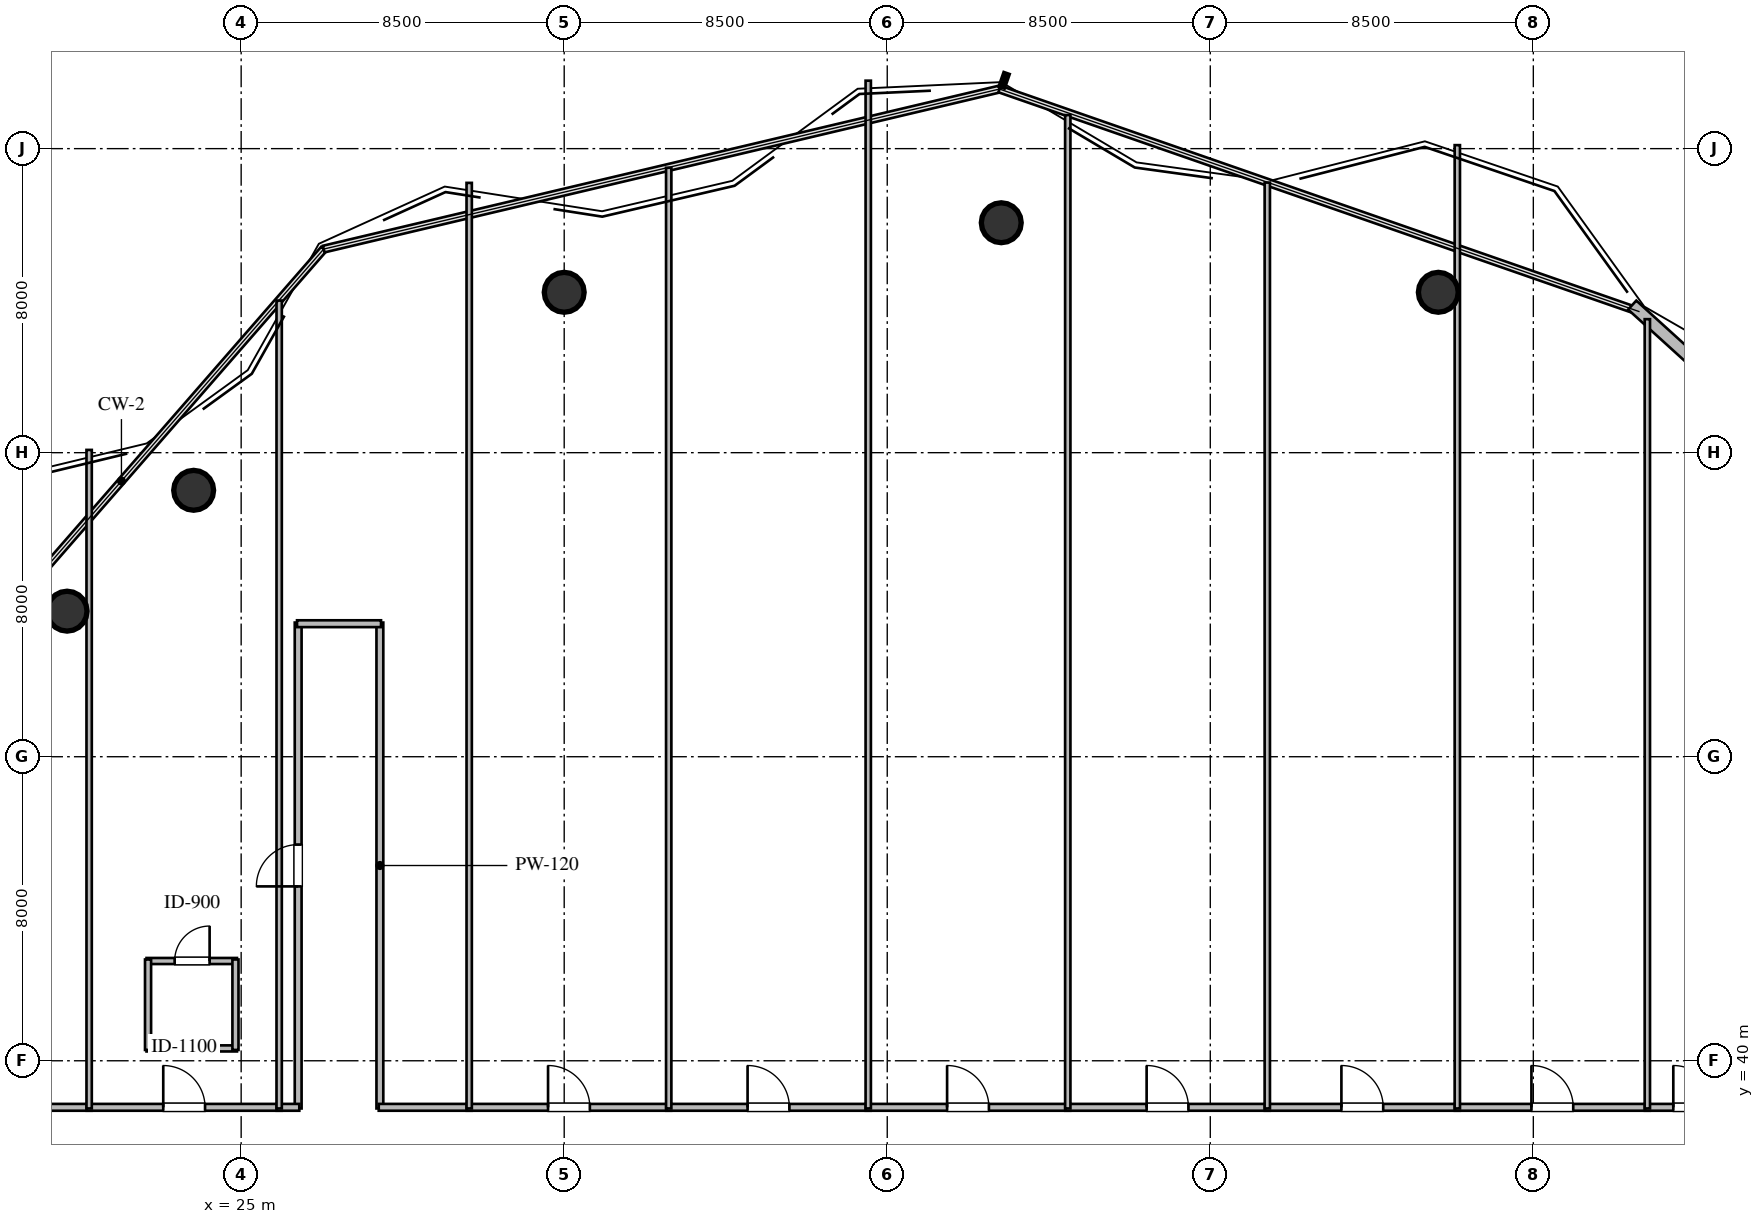
"""IFC4 building model, lengths in metres.
Left out: names, types, materials, properties, quantities, classifications, styles, units other than length and angle.
Written with IfcOpenShell. Run it as: python <this file> out.ifc"""

import sys

from ifc_helpers import new_model, si_unit, direction, frame, frame_2d, origin, origin_2d, place, context, subcontext, project, spatial, rectangle, circle, extrude, element, fill, save


model = new_model("IFC4")
c1 = context("Model", 3, precision=1e-05, world=origin(), true_north=direction((0.0, 1.0)))
c2 = subcontext(c1, "Body", "Model", "MODEL_VIEW")
j1 = project(units=[si_unit("LENGTHUNIT", "METRE"), si_unit("PLANEANGLEUNIT", "RADIAN")], contexts=[c1])
p1 = place(None, origin())
s1 = spatial("IfcSite", under=j1, at=p1, CompositionType="ELEMENT")
p2 = place(p1, origin())
s2 = spatial("IfcBuilding", under=s1, at=p2, CompositionType="ELEMENT")
p3 = place(p2, frame((0.0, 0.0, 199.2)))
s3 = spatial("IfcBuildingStorey", under=s2, at=p3, CompositionType="ELEMENT", Elevation=199.2)
for number, where, z_axis, x_axis in (
    (1, (56.5, 60.22, 0.0), (0.0, 0.0, 1.0), (1.0, 0.0, 0.0)),
    (2, (45.0, 62.05, 0.0), (0.0, 0.0, 1.0), (1.0, 0.0, 0.0)),
    (3, (33.5, 60.22, 0.0), (0.0, 0.0, 1.0), (1.0, 0.0, 0.0)),
    (4, (23.75, 55.01, 0.0), (0.0, 0.0, 1.0), (1.0, 0.0, 0.0)),
    (5, (20.42, 51.83, 0.0), (0.0, 0.0, 1.0), (1.0, 0.0, 0.0)),
):
    element("IfcColumn", number, at=place(p3, frame(where, z_axis=z_axis, x_axis=x_axis)), inside=s3, PredefinedType="COLUMN", context=c2, shape_type="SweptSolid", body=[
        extrude(circle(Radius=0.525, at=origin_2d()), origin(), (0.0, 0.0, 1.0), 3.6),
    ])
p4 = place(p3, frame((61.602, 59.884, 0.0), z_axis=(0.0, 0.0, 1.0), x_axis=(0.740416582554, -0.672148260638, 0.0)))
e6 = element("IfcWall", 6, at=p4, inside=s3, PredefinedType="STANDARD", context=c2, shape_type="SweptSolid", body=[
    extrude(rectangle(XDim=16.361, YDim=0.32, at=frame_2d((8.181, 0.0))), origin(), (0.0, 0.0, 1.0), 3.36),
])
p5 = place(p3, frame((22.51, 40.325, 0.0), z_axis=(0.0, 0.0, 1.0), x_axis=(1.0, 0.0, 0.0)))
e7 = element("IfcWall", 7, at=p5, inside=s3, PredefinedType="PLUMBINGWALL", context=c2, shape_type="SweptSolid", body=[
    extrude(rectangle(XDim=2.38, YDim=0.16, at=frame_2d((1.19, 0.0))), origin(), (0.0, 0.0, 1.0), 3.36),
])
p6 = place(p3, frame((22.51, 42.625, 0.0), z_axis=(0.0, 0.0, 1.0), x_axis=(1.0, 0.0, 0.0)))
e8 = element("IfcWall", 8, at=p6, inside=s3, PredefinedType="PLUMBINGWALL", context=c2, shape_type="SweptSolid", body=[
    extrude(rectangle(XDim=2.38, YDim=0.16, at=frame_2d((1.19, 0.0))), origin(), (0.0, 0.0, 1.0), 3.36),
])
p7 = place(p6, frame((0.74, 0.0, 0.0)))
e9 = element("IfcOpeningElement", 9, at=p7, cuts=e8, PredefinedType="OPENING", context=c2, shape_type="SweptSolid", body=[
    extrude(rectangle(XDim=0.92, YDim=2.1, at=frame_2d((0.46, 1.05))), frame((0.0, 0.09, 0.0), z_axis=(0.0, -1.0, 0.0), x_axis=(1.0, 0.0, 0.0)), (0.0, 0.0, 1.0), 0.18),
])
p8 = place(p3, frame((22.55, 40.285, 0.0), z_axis=(0.0, 0.0, 1.0), x_axis=(0.0, 1.0, 0.0)))
e10 = element("IfcWall", 10, at=p8, inside=s3, PredefinedType="PLUMBINGWALL", context=c2, shape_type="SweptSolid", body=[
    extrude(rectangle(XDim=2.38, YDim=0.16, at=frame_2d((1.19, 0.0))), origin(), (0.0, 0.0, 1.0), 2.806),
])
p9 = place(p3, frame((24.85, 40.285, 0.0), z_axis=(0.0, 0.0, 1.0), x_axis=(0.0, 1.0, 0.0)))
e11 = element("IfcWall", 11, at=p9, inside=s3, PredefinedType="PLUMBINGWALL", context=c2, shape_type="SweptSolid", body=[
    extrude(rectangle(XDim=2.38, YDim=0.16, at=frame_2d((1.19, 0.0))), origin(), (0.0, 0.0, 1.0), 3.36),
])
p10 = place(p3, frame((17.155, 38.775, 0.0), z_axis=(0.0, 0.0, 1.0), x_axis=(1.0, 0.0, 0.0)))
e12 = element("IfcWall", 12, at=p10, inside=s3, PredefinedType="PARTITIONING", context=c2, shape_type="SweptSolid", body=[
    extrude(rectangle(XDim=3.91, YDim=0.18, at=frame_2d((1.955, 0.0))), origin(), (0.0, 0.0, 1.0), 3.36),
])
p11 = place(p10, frame((1.405, 0.0, 0.0)))
e13 = element("IfcOpeningElement", 13, at=p11, cuts=e12, PredefinedType="OPENING", context=c2, shape_type="SweptSolid", body=[
    extrude(rectangle(XDim=1.1, YDim=2.1, at=frame_2d((0.55, 1.05))), frame((0.0, 0.1, 0.0), z_axis=(0.0, -1.0, 0.0), x_axis=(1.0, 0.0, 0.0)), (0.0, 0.0, 1.0), 0.2),
])
p12 = place(p3, frame((20.935, 38.775, 0.0), z_axis=(0.0, 0.0, 1.0), x_axis=(1.0, 0.0, 0.0)))
e14 = element("IfcWall", 14, at=p12, inside=s3, PredefinedType="PARTITIONING", context=c2, shape_type="SweptSolid", body=[
    extrude(rectangle(XDim=5.13, YDim=0.18, at=frame_2d((2.565, 0.0))), origin(), (0.0, 0.0, 1.0), 3.36),
])
p13 = place(p12, frame((2.015, 0.0, 0.0)))
e15 = element("IfcOpeningElement", 15, at=p13, cuts=e14, PredefinedType="OPENING", context=c2, shape_type="SweptSolid", body=[
    extrude(rectangle(XDim=1.1, YDim=2.1, at=frame_2d((0.55, 1.05))), frame((0.0, 0.1, 0.0), z_axis=(0.0, -1.0, 0.0), x_axis=(1.0, 0.0, 0.0)), (0.0, 0.0, 1.0), 0.2),
])
p14 = place(p3, frame((26.5, 38.745, 0.0), z_axis=(0.0, 0.0, 1.0), x_axis=(0.0, 1.0, 0.0)))
e16 = element("IfcWall", 16, at=p14, inside=s3, PredefinedType="PARTITIONING", context=c2, shape_type="SweptSolid", body=[
    extrude(rectangle(XDim=12.785, YDim=0.18, at=frame_2d((6.393, 0.0))), origin(), (0.0, 0.0, 1.0), 3.36),
])
p15 = place(p14, frame((5.843, 0.0, 0.0)))
e17 = element("IfcOpeningElement", 17, at=p15, cuts=e16, PredefinedType="OPENING", context=c2, shape_type="SweptSolid", body=[
    extrude(rectangle(XDim=1.1, YDim=2.1, at=frame_2d((0.55, 1.05))), frame((0.0, 0.1, 0.0), z_axis=(0.0, -1.0, 0.0), x_axis=(1.0, 0.0, 0.0)), (0.0, 0.0, 1.0), 0.2),
])
p16 = place(p3, frame((28.65, 51.53, 0.0), z_axis=(0.0, 0.0, 1.0), x_axis=(0.0, -1.0, 0.0)))
e18 = element("IfcWall", 18, at=p16, inside=s3, PredefinedType="PARTITIONING", context=c2, shape_type="SweptSolid", body=[
    extrude(rectangle(XDim=12.785, YDim=0.18, at=frame_2d((6.393, 0.0))), origin(), (0.0, 0.0, 1.0), 3.36),
])
p17 = place(p3, frame((28.62, 38.775, 0.0), z_axis=(0.0, 0.0, 1.0), x_axis=(1.0, 0.0, 0.0)))
e19 = element("IfcWall", 19, at=p17, inside=s3, PredefinedType="PARTITIONING", context=c2, shape_type="SweptSolid", body=[
    extrude(rectangle(XDim=2.445, YDim=0.18, at=frame_2d((1.222, 0.0))), origin(), (0.0, 0.0, 1.0), 3.36),
])
p18 = place(p3, frame((26.47, 51.5, 0.0), z_axis=(0.0, 0.0, 1.0), x_axis=(1.0, 0.0, 0.0)))
e20 = element("IfcWall", 20, at=p18, inside=s3, PredefinedType="PARTITIONING", context=c2, shape_type="SweptSolid", body=[
    extrude(rectangle(XDim=2.21, YDim=0.18, at=frame_2d((1.105, 0.0))), origin(), (0.0, 0.0, 1.0), 3.36),
])
p19 = place(p3, frame((25.935, 38.775, 0.0), z_axis=(0.0, 0.0, 1.0), x_axis=(1.0, 0.0, 0.0)))
e21 = element("IfcWall", 21, at=p19, inside=s3, PredefinedType="PARTITIONING", context=c2, shape_type="SweptSolid", body=[
    extrude(rectangle(XDim=0.595, YDim=0.18, at=frame_2d((0.297, 0.0))), origin(), (0.0, 0.0, 1.0), 3.36),
])
p20 = place(p3, frame((30.935, 38.775, 0.0), z_axis=(0.0, 0.0, 1.0), x_axis=(1.0, 0.0, 0.0)))
e22 = element("IfcWall", 22, at=p20, inside=s3, PredefinedType="PARTITIONING", context=c2, shape_type="SweptSolid", body=[
    extrude(rectangle(XDim=5.38, YDim=0.18, at=frame_2d((2.69, 0.0))), origin(), (0.0, 0.0, 1.0), 3.36),
])
p21 = place(p20, frame((2.14, 0.0, 0.0)))
e23 = element("IfcOpeningElement", 23, at=p21, cuts=e22, PredefinedType="OPENING", context=c2, shape_type="SweptSolid", body=[
    extrude(rectangle(XDim=1.1, YDim=2.1, at=frame_2d((0.55, 1.05))), frame((0.0, 0.1, 0.0), z_axis=(0.0, -1.0, 0.0), x_axis=(1.0, 0.0, 0.0)), (0.0, 0.0, 1.0), 0.2),
])
p22 = place(p3, frame((36.185, 38.775, 0.0), z_axis=(0.0, 0.0, 1.0), x_axis=(1.0, 0.0, 0.0)))
e24 = element("IfcWall", 24, at=p22, inside=s3, PredefinedType="PARTITIONING", context=c2, shape_type="SweptSolid", body=[
    extrude(rectangle(XDim=5.38, YDim=0.18, at=frame_2d((2.69, 0.0))), origin(), (0.0, 0.0, 1.0), 3.36),
])
p23 = place(p22, frame((2.14, 0.0, 0.0)))
e25 = element("IfcOpeningElement", 25, at=p23, cuts=e24, PredefinedType="OPENING", context=c2, shape_type="SweptSolid", body=[
    extrude(rectangle(XDim=1.1, YDim=2.1, at=frame_2d((0.55, 1.05))), frame((0.0, 0.1, 0.0), z_axis=(0.0, -1.0, 0.0), x_axis=(1.0, 0.0, 0.0)), (0.0, 0.0, 1.0), 0.2),
])
p24 = place(p3, frame((41.435, 38.775, 0.0), z_axis=(0.0, 0.0, 1.0), x_axis=(1.0, 0.0, 0.0)))
e26 = element("IfcWall", 26, at=p24, inside=s3, PredefinedType="PARTITIONING", context=c2, shape_type="SweptSolid", body=[
    extrude(rectangle(XDim=5.38, YDim=0.18, at=frame_2d((2.69, 0.0))), origin(), (0.0, 0.0, 1.0), 3.36),
])
p25 = place(p24, frame((2.14, 0.0, 0.0)))
e27 = element("IfcOpeningElement", 27, at=p25, cuts=e26, PredefinedType="OPENING", context=c2, shape_type="SweptSolid", body=[
    extrude(rectangle(XDim=1.1, YDim=2.1, at=frame_2d((0.55, 1.05))), frame((0.0, 0.1, 0.0), z_axis=(0.0, -1.0, 0.0), x_axis=(1.0, 0.0, 0.0)), (0.0, 0.0, 1.0), 0.2),
])
p26 = place(p3, frame((46.685, 38.775, 0.0), z_axis=(0.0, 0.0, 1.0), x_axis=(1.0, 0.0, 0.0)))
e28 = element("IfcWall", 28, at=p26, inside=s3, PredefinedType="PARTITIONING", context=c2, shape_type="SweptSolid", body=[
    extrude(rectangle(XDim=5.38, YDim=0.18, at=frame_2d((2.69, 0.0))), origin(), (0.0, 0.0, 1.0), 3.36),
])
p27 = place(p26, frame((2.14, 0.0, 0.0)))
e29 = element("IfcOpeningElement", 29, at=p27, cuts=e28, PredefinedType="OPENING", context=c2, shape_type="SweptSolid", body=[
    extrude(rectangle(XDim=1.1, YDim=2.1, at=frame_2d((0.55, 1.05))), frame((0.0, 0.1, 0.0), z_axis=(0.0, -1.0, 0.0), x_axis=(1.0, 0.0, 0.0)), (0.0, 0.0, 1.0), 0.2),
])
p28 = place(p3, frame((51.935, 38.775, 0.0), z_axis=(0.0, 0.0, 1.0), x_axis=(1.0, 0.0, 0.0)))
e30 = element("IfcWall", 30, at=p28, inside=s3, PredefinedType="PARTITIONING", context=c2, shape_type="SweptSolid", body=[
    extrude(rectangle(XDim=5.13, YDim=0.18, at=frame_2d((2.565, 0.0))), origin(), (0.0, 0.0, 1.0), 3.36),
])
p29 = place(p28, frame((2.015, 0.0, 0.0)))
e31 = element("IfcOpeningElement", 31, at=p29, cuts=e30, PredefinedType="OPENING", context=c2, shape_type="SweptSolid", body=[
    extrude(rectangle(XDim=1.1, YDim=2.1, at=frame_2d((0.55, 1.05))), frame((0.0, 0.1, 0.0), z_axis=(0.0, -1.0, 0.0), x_axis=(1.0, 0.0, 0.0)), (0.0, 0.0, 1.0), 0.2),
])
p30 = place(p3, frame((56.935, 38.775, 0.0), z_axis=(0.0, 0.0, 1.0), x_axis=(1.0, 0.0, 0.0)))
e32 = element("IfcWall", 32, at=p30, inside=s3, PredefinedType="PARTITIONING", context=c2, shape_type="SweptSolid", body=[
    extrude(rectangle(XDim=5.13, YDim=0.18, at=frame_2d((2.565, 0.0))), origin(), (0.0, 0.0, 1.0), 3.36),
])
p31 = place(p30, frame((2.015, 0.0, 0.0)))
e33 = element("IfcOpeningElement", 33, at=p31, cuts=e32, PredefinedType="OPENING", context=c2, shape_type="SweptSolid", body=[
    extrude(rectangle(XDim=1.1, YDim=2.1, at=frame_2d((0.55, 1.05))), frame((0.0, 0.1, 0.0), z_axis=(0.0, -1.0, 0.0), x_axis=(1.0, 0.0, 0.0)), (0.0, 0.0, 1.0), 0.2),
])
p32 = place(p3, frame((61.935, 38.775, 0.0), z_axis=(0.0, 0.0, 1.0), x_axis=(1.0, 0.0, 0.0)))
e34 = element("IfcWall", 34, at=p32, inside=s3, PredefinedType="PARTITIONING", context=c2, shape_type="SweptSolid", body=[
    extrude(rectangle(XDim=2.595, YDim=0.18, at=frame_2d((1.297, 0.0))), origin(), (0.0, 0.0, 1.0), 3.36),
])
p33 = place(p32, frame((0.748, 0.0, 0.0)))
e35 = element("IfcOpeningElement", 35, at=p33, cuts=e34, PredefinedType="OPENING", context=c2, shape_type="SweptSolid", body=[
    extrude(rectangle(XDim=1.1, YDim=2.1, at=frame_2d((0.55, 1.05))), frame((0.0, 0.1, 0.0), z_axis=(0.0, -1.0, 0.0), x_axis=(1.0, 0.0, 0.0)), (0.0, 0.0, 1.0), 0.2),
])
p34 = place(p3, frame((21.0, 56.073, 0.0), z_axis=(0.0, 0.0, 1.0), x_axis=(0.0, -1.0, 0.0)))
e36 = element("IfcWall", 36, at=p34, inside=s3, PredefinedType="PARTITIONING", context=c2, shape_type="SweptSolid", body=[
    extrude(rectangle(XDim=17.328, YDim=0.14, at=frame_2d((8.664, 0.0))), origin(), (0.0, 0.0, 1.0), 2.806),
])
p35 = place(p3, frame((26.0, 60.003, 0.0), z_axis=(0.0, 0.0, 1.0), x_axis=(0.0, -1.0, 0.0)))
e37 = element("IfcWall", 37, at=p35, inside=s3, PredefinedType="PARTITIONING", context=c2, shape_type="SweptSolid", body=[
    extrude(rectangle(XDim=21.258, YDim=0.14, at=frame_2d((10.629, 0.0))), origin(), (0.0, 0.0, 1.0), 3.36),
])
p36 = place(p3, frame((31.0, 63.099, 0.0), z_axis=(0.0, 0.0, 1.0), x_axis=(0.0, -1.0, 0.0)))
e38 = element("IfcWall", 38, at=p36, inside=s3, PredefinedType="PARTITIONING", context=c2, shape_type="SweptSolid", body=[
    extrude(rectangle(XDim=24.354, YDim=0.14, at=frame_2d((12.177, 0.0))), origin(), (0.0, 0.0, 1.0), 3.36),
])
p37 = place(p3, frame((36.25, 63.497, 0.0), z_axis=(0.0, 0.0, 1.0), x_axis=(0.0, -1.0, 0.0)))
e39 = element("IfcWall", 39, at=p37, inside=s3, PredefinedType="PARTITIONING", context=c2, shape_type="SweptSolid", body=[
    extrude(rectangle(XDim=24.752, YDim=0.14, at=frame_2d((12.376, 0.0))), origin(), (0.0, 0.0, 1.0), 2.806),
])
p38 = place(p3, frame((41.5, 65.788, 0.0), z_axis=(0.0, 0.0, 1.0), x_axis=(0.0, -1.0, 0.0)))
e40 = element("IfcWall", 40, at=p38, inside=s3, PredefinedType="PARTITIONING", context=c2, shape_type="SweptSolid", body=[
    extrude(rectangle(XDim=27.043, YDim=0.14, at=frame_2d((13.521, 0.0))), origin(), (0.0, 0.0, 1.0), 3.36),
])
p39 = place(p3, frame((46.75, 64.883, 0.0), z_axis=(0.0, 0.0, 1.0), x_axis=(0.0, -1.0, 0.0)))
e41 = element("IfcWall", 41, at=p39, inside=s3, PredefinedType="PARTITIONING", context=c2, shape_type="SweptSolid", body=[
    extrude(rectangle(XDim=26.138, YDim=0.14, at=frame_2d((13.069, 0.0))), origin(), (0.0, 0.0, 1.0), 3.36),
])
p40 = place(p3, frame((52.0, 63.107, 0.0), z_axis=(0.0, 0.0, 1.0), x_axis=(0.0, -1.0, 0.0)))
e42 = element("IfcWall", 42, at=p40, inside=s3, PredefinedType="PARTITIONING", context=c2, shape_type="SweptSolid", body=[
    extrude(rectangle(XDim=24.362, YDim=0.14, at=frame_2d((12.181, 0.0))), origin(), (0.0, 0.0, 1.0), 3.36),
])
p41 = place(p3, frame((57.0, 64.092, 0.0), z_axis=(0.0, 0.0, 1.0), x_axis=(0.0, -1.0, 0.0)))
e43 = element("IfcWall", 43, at=p41, inside=s3, PredefinedType="PARTITIONING", context=c2, shape_type="SweptSolid", body=[
    extrude(rectangle(XDim=25.347, YDim=0.14, at=frame_2d((12.673, 0.0))), origin(), (0.0, 0.0, 1.0), 3.36),
])
p42 = place(p3, frame((62.0, 59.513, 0.0), z_axis=(0.0, 0.0, 1.0), x_axis=(0.0, -1.0, 0.0)))
e44 = element("IfcWall", 44, at=p42, inside=s3, PredefinedType="PARTITIONING", context=c2, shape_type="SweptSolid", body=[
    extrude(rectangle(XDim=20.768, YDim=0.14, at=frame_2d((10.384, 0.0))), origin(), (0.0, 0.0, 1.0), 3.36),
])
p43 = place(p7, origin())
e45 = element("IfcDoor", 45, at=p43, inside=s3, OperationType="SINGLE_SWING_RIGHT", PredefinedType="DOOR", context=c2, shape_type="SweptSolid", body=[
    extrude(rectangle(XDim=0.92, YDim=2.1, at=frame_2d((0.46, 1.05))), frame((0.0, 0.025, 0.0), z_axis=(0.0, -1.0, 0.0), x_axis=(1.0, 0.0, 0.0)), (0.0, 0.0, 1.0), 0.05),
])
fill(e9, e45)
p44 = place(p13, origin())
e46 = element("IfcDoor", 46, at=p44, inside=s3, OperationType="SINGLE_SWING_LEFT", PredefinedType="DOOR", context=c2, shape_type="SweptSolid", body=[
    extrude(rectangle(XDim=1.1, YDim=2.1, at=frame_2d((0.55, 1.05))), frame((0.0, 0.025, 0.0), z_axis=(0.0, -1.0, 0.0), x_axis=(1.0, 0.0, 0.0)), (0.0, 0.0, 1.0), 0.05),
])
fill(e15, e46)
p45 = place(p15, origin())
e47 = element("IfcDoor", 47, at=p45, inside=s3, OperationType="SINGLE_SWING_LEFT", PredefinedType="DOOR", context=c2, shape_type="SweptSolid", body=[
    extrude(rectangle(XDim=1.1, YDim=2.1, at=frame_2d((0.55, 1.05))), frame((0.0, 0.025, 0.0), z_axis=(0.0, -1.0, 0.0), x_axis=(1.0, 0.0, 0.0)), (0.0, 0.0, 1.0), 0.05),
])
fill(e17, e47)
p46 = place(p21, origin())
e48 = element("IfcDoor", 48, at=p46, inside=s3, OperationType="SINGLE_SWING_LEFT", PredefinedType="DOOR", context=c2, shape_type="SweptSolid", body=[
    extrude(rectangle(XDim=1.1, YDim=2.1, at=frame_2d((0.55, 1.05))), frame((0.0, 0.025, 0.0), z_axis=(0.0, -1.0, 0.0), x_axis=(1.0, 0.0, 0.0)), (0.0, 0.0, 1.0), 0.05),
])
fill(e23, e48)
p47 = place(p23, origin())
e49 = element("IfcDoor", 49, at=p47, inside=s3, OperationType="SINGLE_SWING_LEFT", PredefinedType="DOOR", context=c2, shape_type="SweptSolid", body=[
    extrude(rectangle(XDim=1.1, YDim=2.1, at=frame_2d((0.55, 1.05))), frame((0.0, 0.025, 0.0), z_axis=(0.0, -1.0, 0.0), x_axis=(1.0, 0.0, 0.0)), (0.0, 0.0, 1.0), 0.05),
])
fill(e25, e49)
p48 = place(p25, origin())
e50 = element("IfcDoor", 50, at=p48, inside=s3, OperationType="SINGLE_SWING_LEFT", PredefinedType="DOOR", context=c2, shape_type="SweptSolid", body=[
    extrude(rectangle(XDim=1.1, YDim=2.1, at=frame_2d((0.55, 1.05))), frame((0.0, 0.025, 0.0), z_axis=(0.0, -1.0, 0.0), x_axis=(1.0, 0.0, 0.0)), (0.0, 0.0, 1.0), 0.05),
])
fill(e27, e50)
p49 = place(p27, origin())
e51 = element("IfcDoor", 51, at=p49, inside=s3, OperationType="SINGLE_SWING_LEFT", PredefinedType="DOOR", context=c2, shape_type="SweptSolid", body=[
    extrude(rectangle(XDim=1.1, YDim=2.1, at=frame_2d((0.55, 1.05))), frame((0.0, 0.025, 0.0), z_axis=(0.0, -1.0, 0.0), x_axis=(1.0, 0.0, 0.0)), (0.0, 0.0, 1.0), 0.05),
])
fill(e29, e51)
p50 = place(p29, origin())
e52 = element("IfcDoor", 52, at=p50, inside=s3, OperationType="SINGLE_SWING_LEFT", PredefinedType="DOOR", context=c2, shape_type="SweptSolid", body=[
    extrude(rectangle(XDim=1.1, YDim=2.1, at=frame_2d((0.55, 1.05))), frame((0.0, 0.025, 0.0), z_axis=(0.0, -1.0, 0.0), x_axis=(1.0, 0.0, 0.0)), (0.0, 0.0, 1.0), 0.05),
])
fill(e31, e52)
p51 = place(p31, origin())
e53 = element("IfcDoor", 53, at=p51, inside=s3, OperationType="SINGLE_SWING_LEFT", PredefinedType="DOOR", context=c2, shape_type="SweptSolid", body=[
    extrude(rectangle(XDim=1.1, YDim=2.1, at=frame_2d((0.55, 1.05))), frame((0.0, 0.025, 0.0), z_axis=(0.0, -1.0, 0.0), x_axis=(1.0, 0.0, 0.0)), (0.0, 0.0, 1.0), 0.05),
])
fill(e33, e53)
p52 = place(p33, origin())
e54 = element("IfcDoor", 54, at=p52, inside=s3, OperationType="SINGLE_SWING_LEFT", PredefinedType="DOOR", context=c2, shape_type="SweptSolid", body=[
    extrude(rectangle(XDim=1.1, YDim=2.1, at=frame_2d((0.55, 1.05))), frame((0.0, 0.025, 0.0), z_axis=(0.0, -1.0, 0.0), x_axis=(1.0, 0.0, 0.0)), (0.0, 0.0, 1.0), 0.05),
])
fill(e35, e54)
save(model, sys.argv[1])
